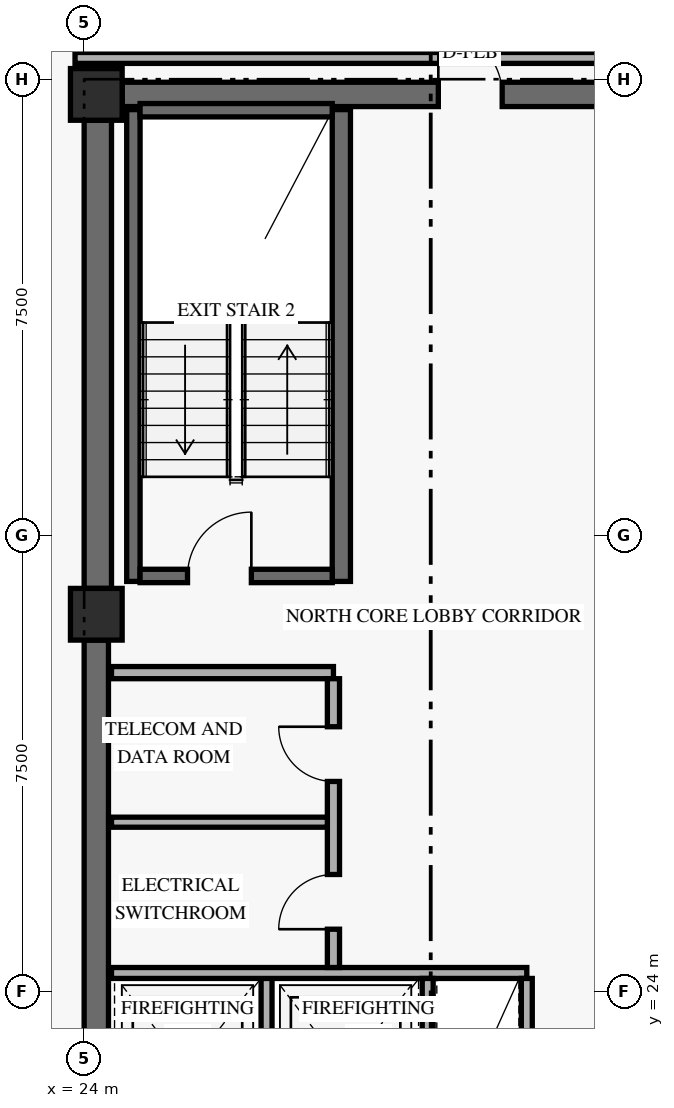
"""IFC4 building model, lengths in metres.
Left out: names, types, materials, properties, quantities, classifications, styles, units other than length and angle.
Written with IfcOpenShell. Run it as: python <this file> out.ifc"""

import sys

from ifc_helpers import new_model, si_unit, direction, frame, frame_2d, origin, origin_2d, place, context, subcontext, project, spatial, rectangle, extrude, element, fill, save


model = new_model("IFC4")
c1 = context("Model", 3, precision=1e-05, world=origin(), true_north=direction((0.0, 1.0)))
c2 = subcontext(c1, "Body", "Model", "MODEL_VIEW")
j1 = project(units=[si_unit("LENGTHUNIT", "METRE"), si_unit("PLANEANGLEUNIT", "RADIAN")], contexts=[c1])
p1 = place(None, origin())
s1 = spatial("IfcSite", under=j1, at=p1, CompositionType="ELEMENT")
p2 = place(p1, origin())
s2 = spatial("IfcBuilding", under=s1, at=p2, CompositionType="ELEMENT")
p3 = place(p2, frame((0.0, 0.0, 132.0)))
s3 = spatial("IfcBuildingStorey", under=s2, at=p3, CompositionType="ELEMENT", Elevation=132.0)
p4 = place(p3, frame((24.2, 17.975, 0.0), z_axis=(0.0, 0.0, 1.0), x_axis=(0.0, 1.0, 0.0)))
e1 = element("IfcWall", 1, at=p4, inside=s3, PredefinedType="SHEAR", context=c2, shape_type="SweptSolid", body=[
    extrude(rectangle(XDim=11.8, YDim=0.4, at=frame_2d((5.9, 0.0))), origin(), (0.0, 0.0, 1.0), 2.689),
])
p5 = place(p3, frame((24.225, 30.625, 0.0), z_axis=(0.0, 0.0, 1.0), x_axis=(0.0, 1.0, 0.0)))
e2 = element("IfcWall", 2, at=p5, inside=s3, PredefinedType="SHEAR", context=c2, shape_type="SweptSolid", body=[
    extrude(rectangle(XDim=7.7, YDim=0.45, at=frame_2d((3.85, 0.0))), origin(), (0.0, 0.0, 1.0), 2.689),
])
p6 = place(p3, frame((24.625, 38.75, 0.0), z_axis=(0.0, 0.0, 1.0), x_axis=(1.0, 0.0, 0.0)))
e3 = element("IfcWall", 3, at=p6, inside=s3, PredefinedType="SHEAR", context=c2, shape_type="SweptSolid", body=[
    extrude(rectangle(XDim=10.15, YDim=0.4, at=frame_2d((5.075, 0.0))), origin(), (0.0, 0.0, 1.0), 3.3),
])
p7 = place(p6, frame((5.2, 0.0, 0.0)))
e4 = element("IfcOpeningElement", 4, at=p7, cuts=e3, PredefinedType="OPENING", context=c2, shape_type="SweptSolid", body=[
    extrude(rectangle(XDim=1.05, YDim=2.15, at=frame_2d((0.525, 1.075))), frame((0.0, 0.21, 0.0), z_axis=(0.0, -1.0, 0.0), x_axis=(1.0, 0.0, 0.0)), (0.0, 0.0, 1.0), 0.42),
])
p8 = place(p3, frame((24.81, 30.74, 0.0), z_axis=(0.0, 0.0, 1.0), x_axis=(0.0, 1.0, 0.0)))
e5 = element("IfcWall", 5, at=p8, inside=s3, PredefinedType="SHEAR", context=c2, shape_type="SweptSolid", body=[
    extrude(rectangle(XDim=7.76, YDim=0.22, at=frame_2d((3.88, 0.0))), origin(), (0.0, 0.0, 1.0), 3.3),
])
p9 = place(p3, frame((28.23, 30.74, 0.0), z_axis=(0.0, 0.0, 1.0), x_axis=(0.0, 1.0, 0.0)))
e6 = element("IfcWall", 6, at=p9, inside=s3, PredefinedType="SHEAR", context=c2, shape_type="SweptSolid", body=[
    extrude(rectangle(XDim=7.76, YDim=0.3, at=frame_2d((3.88, 0.0))), origin(), (0.0, 0.0, 1.0), 3.3),
])
p10 = place(p3, frame((24.92, 30.83, 0.0), z_axis=(0.0, 0.0, 1.0), x_axis=(1.0, 0.0, 0.0)))
e7 = element("IfcWall", 7, at=p10, inside=s3, PredefinedType="SHEAR", context=c2, shape_type="SweptSolid", body=[
    extrude(rectangle(XDim=3.16, YDim=0.22, at=frame_2d((1.58, 0.0))), origin(), (0.0, 0.0, 1.0), 3.3),
])
p11 = place(p10, frame((0.78, 0.0, 0.0)))
e8 = element("IfcOpeningElement", 8, at=p11, cuts=e7, PredefinedType="OPENING", context=c2, shape_type="SweptSolid", body=[
    extrude(rectangle(XDim=1.05, YDim=2.15, at=frame_2d((0.525, 1.075))), frame((0.0, 0.12, 0.0), z_axis=(0.0, -1.0, 0.0), x_axis=(1.0, 0.0, 0.0)), (0.0, 0.0, 1.0), 0.24),
])
p12 = place(p3, frame((24.92, 38.49, 0.0), z_axis=(0.0, 0.0, 1.0), x_axis=(1.0, 0.0, 0.0)))
e9 = element("IfcWall", 9, at=p12, inside=s3, PredefinedType="SHEAR", context=c2, shape_type="SweptSolid", body=[
    extrude(rectangle(XDim=3.16, YDim=0.22, at=frame_2d((1.58, 0.0))), origin(), (0.0, 0.0, 1.0), 3.3),
])
for number, where, z_axis, x_axis in (
    (10, (24.2, 30.2, 0.0), (0.0, 0.0, 1.0), (1.0, 0.0, 0.0)),
    (11, (24.2, 38.75, 0.0), (0.0, 0.0, 1.0), (1.0, 0.0, 0.0)),
):
    element("IfcColumn", number, at=place(p3, frame(where, z_axis=z_axis, x_axis=x_axis)), inside=s3, PredefinedType="COLUMN", context=c2, shape_type="SweptSolid", body=[
        extrude(rectangle(XDim=0.85, YDim=0.85, at=origin_2d()), origin(), (0.0, 0.0, 1.0), 3.6),
    ])
p13 = place(p3, frame((27.0, 21.19, 0.0), z_axis=(0.0, 0.0, 1.0), x_axis=(0.0, 1.0, 0.0)))
e12 = element("IfcWall", 12, at=p13, inside=s3, PredefinedType="STANDARD", context=c2, shape_type="SweptSolid", body=[
    extrude(rectangle(XDim=3.11, YDim=0.18, at=frame_2d((1.555, 0.0))), origin(), (0.0, 0.0, 1.0), 3.3),
])
p14 = place(p3, frame((24.45, 24.3, 0.0), z_axis=(0.0, 0.0, 1.0), x_axis=(1.0, 0.0, 0.0)))
e13 = element("IfcWall", 13, at=p14, inside=s3, PredefinedType="STANDARD", context=c2, shape_type="SweptSolid", body=[
    extrude(rectangle(XDim=6.83, YDim=0.18, at=frame_2d((3.415, 0.0))), origin(), (0.0, 0.0, 1.0), 3.3),
])
for number, where, z_axis, x_axis in (
    (14, (29.65, 21.19, 0.0), (0.0, 0.0, 1.0), (0.0, 1.0, 0.0)),
    (15, (31.28, 21.19, 0.0), (0.0, 0.0, 1.0), (0.0, 1.0, 0.0)),
):
    element("IfcWall", number, at=place(p3, frame(where, z_axis=z_axis, x_axis=x_axis)), inside=s3, PredefinedType="STANDARD", context=c2, shape_type="SweptSolid", body=[
        extrude(rectangle(XDim=3.02, YDim=0.18, at=frame_2d((1.51, 0.0))), origin(), (0.0, 0.0, 1.0), 3.3),
    ])
p15 = place(p3, frame((24.45, 29.24, 0.0), z_axis=(0.0, 0.0, 1.0), x_axis=(1.0, 0.0, 0.0)))
e16 = element("IfcWall", 16, at=p15, inside=s3, PredefinedType="STANDARD", context=c2, shape_type="SweptSolid", body=[
    extrude(rectangle(XDim=3.65, YDim=0.2, at=frame_2d((1.825, 0.0))), origin(), (0.0, 0.0, 1.0), 3.3),
])
p16 = place(p3, frame((28.1, 24.39, 0.0), z_axis=(0.0, 0.0, 1.0), x_axis=(0.0, 1.0, 0.0)))
e17 = element("IfcWall", 17, at=p16, inside=s3, PredefinedType="STANDARD", context=c2, shape_type="SweptSolid", body=[
    extrude(rectangle(XDim=4.75, YDim=0.2, at=frame_2d((2.375, 0.0))), origin(), (0.0, 0.0, 1.0), 3.3),
])
p17 = place(p16, frame((0.63, 0.0, 0.0)))
e18 = element("IfcOpeningElement", 18, at=p17, cuts=e17, PredefinedType="OPENING", context=c2, shape_type="SweptSolid", body=[
    extrude(rectangle(XDim=0.9, YDim=2.1, at=frame_2d((0.45, 1.05))), frame((0.0, 0.11, 0.0), z_axis=(0.0, -1.0, 0.0), x_axis=(1.0, 0.0, 0.0)), (0.0, 0.0, 1.0), 0.22),
])
p18 = place(p16, frame((3.06, 0.0, 0.0)))
e19 = element("IfcOpeningElement", 19, at=p18, cuts=e17, PredefinedType="OPENING", context=c2, shape_type="SweptSolid", body=[
    extrude(rectangle(XDim=0.9, YDim=2.1, at=frame_2d((0.45, 1.05))), frame((0.0, 0.11, 0.0), z_axis=(0.0, -1.0, 0.0), x_axis=(1.0, 0.0, 0.0)), (0.0, 0.0, 1.0), 0.22),
])
p19 = place(p3, frame((24.45, 26.78, 0.0), z_axis=(0.0, 0.0, 1.0), x_axis=(1.0, 0.0, 0.0)))
e20 = element("IfcWall", 20, at=p19, inside=s3, PredefinedType="PARTITIONING", context=c2, shape_type="SweptSolid", body=[
    extrude(rectangle(XDim=3.55, YDim=0.165, at=frame_2d((1.775, 0.0))), origin(), (0.0, 0.0, 1.0), 3.3),
])
p20 = place(p3, frame((23.85, 39.35, 0.0), z_axis=(0.0, 0.0, 1.0), x_axis=(1.0, 0.0, 0.0)))
e21 = element("IfcWall", 21, at=p20, inside=s3, PredefinedType="STANDARD", context=c2, shape_type="SweptSolid", body=[
    extrude(rectangle(XDim=11.57, YDim=0.18, at=frame_2d((5.785, 0.0))), origin(), (0.0, 0.0, 1.0), 2.671),
])
p21 = place(p11, origin())
e22 = element("IfcDoor", 22, at=p21, inside=s3, OperationType="SINGLE_SWING_RIGHT", PredefinedType="DOOR", context=c2, shape_type="SweptSolid", body=[
    extrude(rectangle(XDim=1.05, YDim=2.15, at=frame_2d((0.525, 1.075))), frame((0.0, 0.025, 0.0), z_axis=(0.0, -1.0, 0.0), x_axis=(1.0, 0.0, 0.0)), (0.0, 0.0, 1.0), 0.05),
])
fill(e8, e22)
p22 = place(p17, origin())
e23 = element("IfcDoor", 23, at=p22, inside=s3, OperationType="SINGLE_SWING_LEFT", PredefinedType="DOOR", context=c2, shape_type="SweptSolid", body=[
    extrude(rectangle(XDim=0.9, YDim=2.1, at=frame_2d((0.45, 1.05))), frame((0.0, 0.025, 0.0), z_axis=(0.0, -1.0, 0.0), x_axis=(1.0, 0.0, 0.0)), (0.0, 0.0, 1.0), 0.05),
])
fill(e18, e23)
p23 = place(p18, origin())
e24 = element("IfcDoor", 24, at=p23, inside=s3, OperationType="SINGLE_SWING_RIGHT", PredefinedType="DOOR", context=c2, shape_type="SweptSolid", body=[
    extrude(rectangle(XDim=0.9, YDim=2.1, at=frame_2d((0.45, 1.05))), frame((0.0, 0.025, 0.0), z_axis=(0.0, -1.0, 0.0), x_axis=(1.0, 0.0, 0.0)), (0.0, 0.0, 1.0), 0.05),
])
fill(e19, e24)
p24 = place(p7, frame((1.05, 0.0, 0.0), z_axis=(0.0, 0.0, 1.0), x_axis=(-1.0, 0.0, 0.0)))
e25 = element("IfcDoor", 25, at=p24, inside=s3, OperationType="SINGLE_SWING_RIGHT", PredefinedType="DOOR", context=c2, shape_type="SweptSolid", body=[
    extrude(rectangle(XDim=1.05, YDim=2.15, at=frame_2d((0.525, 1.075))), frame((0.0, 0.025, 0.0), z_axis=(0.0, -1.0, 0.0), x_axis=(1.0, 0.0, 0.0)), (0.0, 0.0, 1.0), 0.05),
])
fill(e4, e25)
save(model, sys.argv[1])
